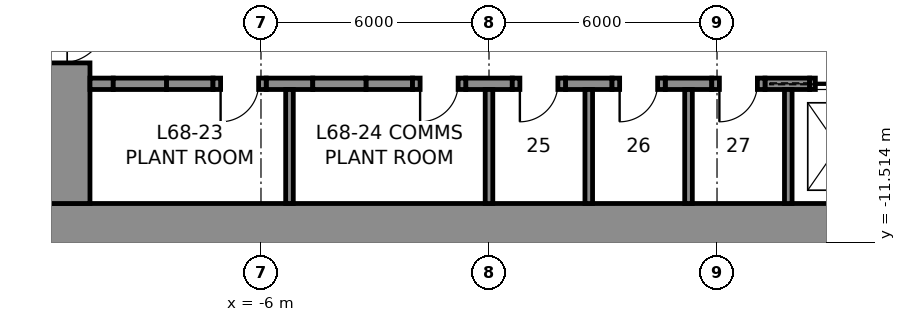
"""IFC4 building model, lengths in metres.
Left out: names, types, materials, properties, quantities, classifications, styles, units other than length and angle.
Written with IfcOpenShell. Run it as: python <this file> out.ifc"""

import sys

from ifc_helpers import new_model, si_unit, direction, frame, frame_2d, origin, place, context, subcontext, project, spatial, rectangle, extrude, element, fill, save


model = new_model("IFC4")
c1 = context("Model", 3, precision=1e-05, world=origin(), true_north=direction((0.0, 1.0)))
c2 = subcontext(c1, "Body", "Model", "MODEL_VIEW")
j1 = project(units=[si_unit("LENGTHUNIT", "METRE"), si_unit("PLANEANGLEUNIT", "RADIAN")], contexts=[c1])
p1 = place(None, origin())
s1 = spatial("IfcSite", under=j1, at=p1, CompositionType="ELEMENT")
p2 = place(p1, origin())
s2 = spatial("IfcBuilding", under=s1, at=p2, CompositionType="ELEMENT")
p3 = place(p2, frame((0.0, 0.0, 302.8)))
s3 = spatial("IfcBuildingStorey", under=s2, at=p3, CompositionType="ELEMENT", Elevation=302.8)
p4 = place(p3, frame((12.0, -11.25, 0.0), z_axis=(0.0, 0.0, 1.0), x_axis=(-1.0, 0.0, 0.0)))
e1 = element("IfcWall", 1, at=p4, inside=s3, PredefinedType="SHEAR", context=c2, shape_type="SweptSolid", body=[
    extrude(rectangle(XDim=24.0, YDim=1.5, at=frame_2d((12.0, 0.0))), origin(), (0.0, 0.0, 1.0), 5.0),
])
p5 = place(p3, frame((-11.25, -10.5, 0.0), z_axis=(0.0, 0.0, 1.0), x_axis=(0.0, 1.0, 0.0)))
e2 = element("IfcWall", 2, at=p5, inside=s3, PredefinedType="SHEAR", context=c2, shape_type="SweptSolid", body=[
    extrude(rectangle(XDim=21.0, YDim=1.5, at=frame_2d((10.5, 0.0))), origin(), (0.0, 0.0, 1.0), 5.0),
])
p6 = place(p5, frame((16.1, 0.0, 0.0)))
e3 = element("IfcOpeningElement", 3, at=p6, cuts=e2, PredefinedType="OPENING", context=c2, shape_type="SweptSolid", body=[
    extrude(rectangle(XDim=1.2, YDim=2.3, at=frame_2d((0.6, 1.15))), frame((0.0, 0.76, 0.0), z_axis=(0.0, -1.0, 0.0), x_axis=(1.0, 0.0, 0.0)), (0.0, 0.0, 1.0), 1.52),
])
p7 = place(p5, frame((3.7, 0.0, 0.0)))
e4 = element("IfcOpeningElement", 4, at=p7, cuts=e2, PredefinedType="OPENING", context=c2, shape_type="SweptSolid", body=[
    extrude(rectangle(XDim=1.2, YDim=2.3, at=frame_2d((0.6, 1.15))), frame((0.0, 0.76, 0.0), z_axis=(0.0, -1.0, 0.0), x_axis=(1.0, 0.0, 0.0)), (0.0, 0.0, 1.0), 1.52),
])
p8 = place(p3, frame((-10.5, -7.35, 0.0), z_axis=(0.0, 0.0, 1.0), x_axis=(1.0, 0.0, 0.0)))
e5 = element("IfcWall", 5, at=p8, inside=s3, PredefinedType="SHEAR", context=c2, shape_type="SweptSolid", body=[
    extrude(rectangle(XDim=0.613, YDim=0.3, at=frame_2d((0.306, 0.0))), origin(), (0.0, 0.0, 1.0), 5.0),
])
for number, where, z_axis, x_axis in (
    (6, (-8.488, -7.35, 0.0), (0.0, 0.0, 1.0), (1.0, 0.0, 0.0)),
    (7, (-5.863, -7.35, 0.0), (0.0, 0.0, 1.0), (1.0, 0.0, 0.0)),
    (8, (-3.238, -7.35, 0.0), (0.0, 0.0, 1.0), (1.0, 0.0, 0.0)),
    (9, (-0.613, -7.35, 0.0), (0.0, 0.0, 1.0), (1.0, 0.0, 0.0)),
    (10, (2.012, -7.35, 0.0), (0.0, 0.0, 1.0), (1.0, 0.0, 0.0)),
    (11, (4.637, -7.35, 0.0), (0.0, 0.0, 1.0), (1.0, 0.0, 0.0)),
):
    element("IfcWall", number, at=place(p3, frame(where, z_axis=z_axis, x_axis=x_axis)), inside=s3, PredefinedType="SHEAR", context=c2, shape_type="SweptSolid", body=[
        extrude(rectangle(XDim=1.225, YDim=0.3, at=frame_2d((0.613, 0.0))), origin(), (0.0, 0.0, 1.0), 5.0),
    ])
p9 = place(p3, frame((7.262, -7.35, 0.0), z_axis=(0.0, 0.0, 1.0), x_axis=(1.0, 0.0, 0.0)))
e12 = element("IfcWall", 12, at=p9, inside=s3, PredefinedType="SHEAR", context=c2, shape_type="SweptSolid", body=[
    extrude(rectangle(XDim=1.175, YDim=0.3, at=frame_2d((0.587, 0.0))), origin(), (0.0, 0.0, 1.0), 5.0),
])
p10 = place(p3, frame((-9.887, -7.35, 0.0), z_axis=(0.0, 0.0, 1.0), x_axis=(1.0, 0.0, 0.0)))
e13 = element("IfcWall", 13, at=p10, inside=s3, PredefinedType="PARTITIONING", context=c2, shape_type="SweptSolid", body=[
    extrude(rectangle(XDim=1.4, YDim=0.3, at=frame_2d((0.7, 0.0))), origin(), (0.0, 0.0, 1.0), 5.0),
])
p11 = place(p3, frame((-7.262, -7.35, 0.0), z_axis=(0.0, 0.0, 1.0), x_axis=(1.0, 0.0, 0.0)))
e14 = element("IfcWall", 14, at=p11, inside=s3, PredefinedType="PARTITIONING", context=c2, shape_type="SweptSolid", body=[
    extrude(rectangle(XDim=1.4, YDim=0.3, at=frame_2d((0.7, 0.0))), origin(), (0.0, 0.0, 1.0), 5.0),
])
p12 = place(p11, frame((0.2, 0.0, 0.0)))
e15 = element("IfcOpeningElement", 15, at=p12, cuts=e14, PredefinedType="OPENING", context=c2, shape_type="SweptSolid", body=[
    extrude(rectangle(XDim=1.0, YDim=2.3, at=frame_2d((0.5, 1.15))), frame((0.0, 0.16, 0.0), z_axis=(0.0, -1.0, 0.0), x_axis=(1.0, 0.0, 0.0)), (0.0, 0.0, 1.0), 0.32),
])
p13 = place(p3, frame((-4.637, -7.35, 0.0), z_axis=(0.0, 0.0, 1.0), x_axis=(1.0, 0.0, 0.0)))
e16 = element("IfcWall", 16, at=p13, inside=s3, PredefinedType="PARTITIONING", context=c2, shape_type="SweptSolid", body=[
    extrude(rectangle(XDim=1.4, YDim=0.3, at=frame_2d((0.7, 0.0))), origin(), (0.0, 0.0, 1.0), 5.0),
])
p14 = place(p3, frame((-2.012, -7.35, 0.0), z_axis=(0.0, 0.0, 1.0), x_axis=(1.0, 0.0, 0.0)))
e17 = element("IfcWall", 17, at=p14, inside=s3, PredefinedType="PARTITIONING", context=c2, shape_type="SweptSolid", body=[
    extrude(rectangle(XDim=1.4, YDim=0.3, at=frame_2d((0.7, 0.0))), origin(), (0.0, 0.0, 1.0), 5.0),
])
p15 = place(p14, frame((0.2, 0.0, 0.0)))
e18 = element("IfcOpeningElement", 18, at=p15, cuts=e17, PredefinedType="OPENING", context=c2, shape_type="SweptSolid", body=[
    extrude(rectangle(XDim=1.0, YDim=2.3, at=frame_2d((0.5, 1.15))), frame((0.0, 0.16, 0.0), z_axis=(0.0, -1.0, 0.0), x_axis=(1.0, 0.0, 0.0)), (0.0, 0.0, 1.0), 0.32),
])
p16 = place(p3, frame((0.613, -7.35, 0.0), z_axis=(0.0, 0.0, 1.0), x_axis=(1.0, 0.0, 0.0)))
e19 = element("IfcWall", 19, at=p16, inside=s3, PredefinedType="PARTITIONING", context=c2, shape_type="SweptSolid", body=[
    extrude(rectangle(XDim=1.4, YDim=0.3, at=frame_2d((0.7, 0.0))), origin(), (0.0, 0.0, 1.0), 5.0),
])
p17 = place(p16, frame((0.2, 0.0, 0.0)))
e20 = element("IfcOpeningElement", 20, at=p17, cuts=e19, PredefinedType="OPENING", context=c2, shape_type="SweptSolid", body=[
    extrude(rectangle(XDim=1.0, YDim=2.3, at=frame_2d((0.5, 1.15))), frame((0.0, 0.16, 0.0), z_axis=(0.0, -1.0, 0.0), x_axis=(1.0, 0.0, 0.0)), (0.0, 0.0, 1.0), 0.32),
])
p18 = place(p3, frame((3.238, -7.35, 0.0), z_axis=(0.0, 0.0, 1.0), x_axis=(1.0, 0.0, 0.0)))
e21 = element("IfcWall", 21, at=p18, inside=s3, PredefinedType="PARTITIONING", context=c2, shape_type="SweptSolid", body=[
    extrude(rectangle(XDim=1.4, YDim=0.3, at=frame_2d((0.7, 0.0))), origin(), (0.0, 0.0, 1.0), 5.0),
])
p19 = place(p18, frame((0.2, 0.0, 0.0)))
e22 = element("IfcOpeningElement", 22, at=p19, cuts=e21, PredefinedType="OPENING", context=c2, shape_type="SweptSolid", body=[
    extrude(rectangle(XDim=1.0, YDim=2.3, at=frame_2d((0.5, 1.15))), frame((0.0, 0.16, 0.0), z_axis=(0.0, -1.0, 0.0), x_axis=(1.0, 0.0, 0.0)), (0.0, 0.0, 1.0), 0.32),
])
p20 = place(p3, frame((5.863, -7.35, 0.0), z_axis=(0.0, 0.0, 1.0), x_axis=(1.0, 0.0, 0.0)))
e23 = element("IfcWall", 23, at=p20, inside=s3, PredefinedType="PARTITIONING", context=c2, shape_type="SweptSolid", body=[
    extrude(rectangle(XDim=1.4, YDim=0.3, at=frame_2d((0.7, 0.0))), origin(), (0.0, 0.0, 1.0), 5.0),
])
p21 = place(p20, frame((0.2, 0.0, 0.0)))
e24 = element("IfcOpeningElement", 24, at=p21, cuts=e23, PredefinedType="OPENING", context=c2, shape_type="SweptSolid", body=[
    extrude(rectangle(XDim=1.0, YDim=2.3, at=frame_2d((0.5, 1.15))), frame((0.0, 0.16, 0.0), z_axis=(0.0, -1.0, 0.0), x_axis=(1.0, 0.0, 0.0)), (0.0, 0.0, 1.0), 0.32),
])
p22 = place(p3, frame((8.438, -7.35, 0.0), z_axis=(0.0, 0.0, 1.0), x_axis=(1.0, 0.0, 0.0)))
e25 = element("IfcWall", 25, at=p22, inside=s3, PredefinedType="PARTITIONING", context=c2, shape_type="SweptSolid", body=[
    extrude(rectangle(XDim=1.5, YDim=0.3, at=frame_2d((0.75, 0.0))), origin(), (0.0, 0.0, 1.0), 5.0),
])
p23 = place(p22, frame((0.15, 0.0, 0.0)))
e26 = element("IfcOpeningElement", 26, at=p23, cuts=e25, PredefinedType="OPENING", context=c2, shape_type="SweptSolid", body=[
    extrude(rectangle(XDim=1.2, YDim=2.3, at=frame_2d((0.6, 1.15))), frame((0.0, 0.16, 0.0), z_axis=(0.0, -1.0, 0.0), x_axis=(1.0, 0.0, 0.0)), (0.0, 0.0, 1.0), 0.32),
])
for number, where, z_axis, x_axis in (
    (27, (-5.25, -10.5, 0.0), (0.0, 0.0, 1.0), (0.0, 1.0, 0.0)),
    (28, (0.0, -10.5, 0.0), (0.0, 0.0, 1.0), (0.0, 1.0, 0.0)),
    (29, (2.625, -10.5, 0.0), (0.0, 0.0, 1.0), (0.0, 1.0, 0.0)),
    (30, (5.25, -10.5, 0.0), (0.0, 0.0, 1.0), (0.0, 1.0, 0.0)),
    (31, (7.875, -10.5, 0.0), (0.0, 0.0, 1.0), (0.0, 1.0, 0.0)),
):
    element("IfcWall", number, at=place(p3, frame(where, z_axis=z_axis, x_axis=x_axis)), inside=s3, PredefinedType="PARTITIONING", context=c2, shape_type="SweptSolid", body=[
        extrude(rectangle(XDim=3.0, YDim=0.2, at=frame_2d((1.5, 0.0))), origin(), (0.0, 0.0, 1.0), 5.0),
    ])
p24 = place(p12, frame((1.0, 0.0, 0.0), z_axis=(0.0, 0.0, 1.0), x_axis=(-1.0, 0.0, 0.0)))
e32 = element("IfcDoor", 32, at=p24, inside=s3, OperationType="SINGLE_SWING_RIGHT", PredefinedType="DOOR", context=c2, shape_type="SweptSolid", body=[
    extrude(rectangle(XDim=1.0, YDim=2.3, at=frame_2d((0.5, 1.15))), frame((0.0, 0.025, 0.0), z_axis=(0.0, -1.0, 0.0), x_axis=(1.0, 0.0, 0.0)), (0.0, 0.0, 1.0), 0.05),
])
fill(e15, e32)
p25 = place(p15, frame((1.0, 0.0, 0.0), z_axis=(0.0, 0.0, 1.0), x_axis=(-1.0, 0.0, 0.0)))
e33 = element("IfcDoor", 33, at=p25, inside=s3, OperationType="SINGLE_SWING_RIGHT", PredefinedType="DOOR", context=c2, shape_type="SweptSolid", body=[
    extrude(rectangle(XDim=1.0, YDim=2.3, at=frame_2d((0.5, 1.15))), frame((0.0, 0.025, 0.0), z_axis=(0.0, -1.0, 0.0), x_axis=(1.0, 0.0, 0.0)), (0.0, 0.0, 1.0), 0.05),
])
fill(e18, e33)
p26 = place(p17, frame((1.0, 0.0, 0.0), z_axis=(0.0, 0.0, 1.0), x_axis=(-1.0, 0.0, 0.0)))
e34 = element("IfcDoor", 34, at=p26, inside=s3, OperationType="SINGLE_SWING_RIGHT", PredefinedType="DOOR", context=c2, shape_type="SweptSolid", body=[
    extrude(rectangle(XDim=1.0, YDim=2.3, at=frame_2d((0.5, 1.15))), frame((0.0, 0.025, 0.0), z_axis=(0.0, -1.0, 0.0), x_axis=(1.0, 0.0, 0.0)), (0.0, 0.0, 1.0), 0.05),
])
fill(e20, e34)
p27 = place(p19, frame((1.0, 0.0, 0.0), z_axis=(0.0, 0.0, 1.0), x_axis=(-1.0, 0.0, 0.0)))
e35 = element("IfcDoor", 35, at=p27, inside=s3, OperationType="SINGLE_SWING_RIGHT", PredefinedType="DOOR", context=c2, shape_type="SweptSolid", body=[
    extrude(rectangle(XDim=1.0, YDim=2.3, at=frame_2d((0.5, 1.15))), frame((0.0, 0.025, 0.0), z_axis=(0.0, -1.0, 0.0), x_axis=(1.0, 0.0, 0.0)), (0.0, 0.0, 1.0), 0.05),
])
fill(e22, e35)
p28 = place(p21, frame((1.0, 0.0, 0.0), z_axis=(0.0, 0.0, 1.0), x_axis=(-1.0, 0.0, 0.0)))
e36 = element("IfcDoor", 36, at=p28, inside=s3, OperationType="SINGLE_SWING_RIGHT", PredefinedType="DOOR", context=c2, shape_type="SweptSolid", body=[
    extrude(rectangle(XDim=1.0, YDim=2.3, at=frame_2d((0.5, 1.15))), frame((0.0, 0.025, 0.0), z_axis=(0.0, -1.0, 0.0), x_axis=(1.0, 0.0, 0.0)), (0.0, 0.0, 1.0), 0.05),
])
fill(e24, e36)
p29 = place(p7, frame((1.2, 0.0, 0.0), z_axis=(0.0, 0.0, 1.0), x_axis=(-1.0, 0.0, 0.0)))
e37 = element("IfcDoor", 37, at=p29, inside=s3, OperationType="SINGLE_SWING_LEFT", PredefinedType="DOOR", context=c2, shape_type="SweptSolid", body=[
    extrude(rectangle(XDim=1.2, YDim=2.3, at=frame_2d((0.6, 1.15))), frame((0.0, 0.025, 0.0), z_axis=(0.0, -1.0, 0.0), x_axis=(1.0, 0.0, 0.0)), (0.0, 0.0, 1.0), 0.05),
])
fill(e4, e37)
p30 = place(p23, origin())
e38 = element("IfcDoor", 38, at=p30, inside=s3, OperationType="SLIDING_TO_LEFT", PredefinedType="DOOR", context=c2, shape_type="SweptSolid", body=[
    extrude(rectangle(XDim=1.2, YDim=2.3, at=frame_2d((0.6, 1.15))), frame((0.0, 0.025, 0.0), z_axis=(0.0, -1.0, 0.0), x_axis=(1.0, 0.0, 0.0)), (0.0, 0.0, 1.0), 0.05),
])
fill(e26, e38)
save(model, sys.argv[1])
